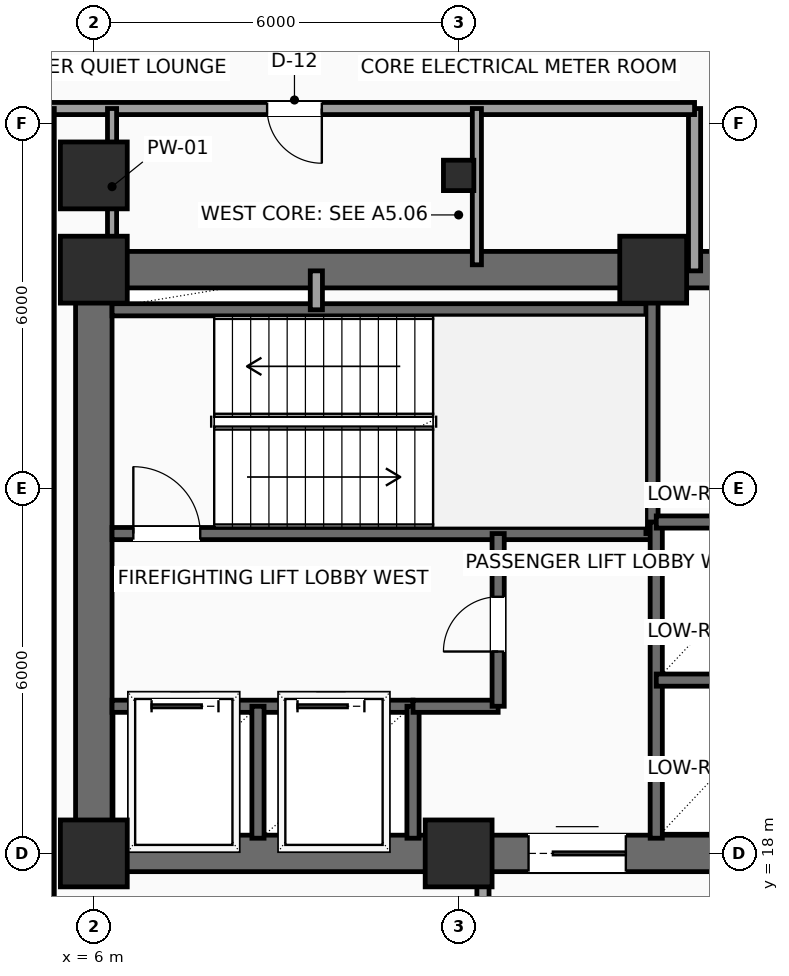
"""IFC4 building model, lengths in metres.
Left out: names, types, materials, properties, quantities, classifications, styles, units other than length and angle.
Written with IfcOpenShell. Run it as: python <this file> out.ifc"""

import sys

from ifc_helpers import new_model, si_unit, direction, frame, frame_2d, origin, origin_2d, place, context, subcontext, project, spatial, rectangle, hollow_rectangle, extrude, element, fill, save


model = new_model("IFC4")
c1 = context("Model", 3, precision=1e-05, world=origin(), true_north=direction((0.0, 1.0)))
c2 = subcontext(c1, "Body", "Model", "MODEL_VIEW")
j1 = project(units=[si_unit("LENGTHUNIT", "METRE"), si_unit("PLANEANGLEUNIT", "RADIAN")], contexts=[c1])
p1 = place(None, origin())
s1 = spatial("IfcSite", under=j1, at=p1, CompositionType="ELEMENT")
p2 = place(p1, origin())
s2 = spatial("IfcBuilding", under=s1, at=p2, CompositionType="ELEMENT")
p3 = place(p2, frame((0.0, 0.0, 107.1)))
s3 = spatial("IfcBuildingStorey", under=s2, at=p3, CompositionType="ELEMENT", Elevation=107.1)
for number, where, z_axis, x_axis in (
    (1, (6.0, 18.0, 0.0), (0.0, 0.0, 1.0), (1.0, 0.0, 0.0)),
    (2, (12.0, 18.0, 0.0), (0.0, 0.0, 1.0), (1.0, 0.0, 0.0)),
    (3, (6.0, 27.6, 0.0), (0.0, 0.0, 1.0), (1.0, 0.0, 0.0)),
    (4, (15.2, 27.6, 0.0), (0.0, 0.0, 1.0), (1.0, 0.0, 0.0)),
    (5, (6.0, 29.15, 0.0), (0.0, 0.0, 1.0), (1.0, 0.0, 0.0)),
):
    element("IfcColumn", number, at=place(p3, frame(where, z_axis=z_axis, x_axis=x_axis)), inside=s3, PredefinedType="COLUMN", context=c2, shape_type="SweptSolid", body=[
        extrude(rectangle(XDim=1.1, YDim=1.1, at=origin_2d()), origin(), (0.0, 0.0, 1.0), 3.75),
    ])
p4 = place(p3, frame((12.0, 29.15, 0.0), z_axis=(0.0, 0.0, 1.0), x_axis=(1.0, 0.0, 0.0)))
e6 = element("IfcColumn", 6, at=p4, inside=s3, PredefinedType="COLUMN", context=c2, shape_type="SweptSolid", body=[
    extrude(hollow_rectangle(XDim=0.5, YDim=0.5, WallThickness=0.025, InnerFilletRadius=0.025, OuterFilletRadius=0.04, at=origin_2d()), origin(), (0.0, 0.0, 1.0), 3.75),
])
p5 = place(p3, frame((6.0, 18.0, 0.0), z_axis=(0.0, 0.0, 1.0), x_axis=(1.0, 0.0, 0.0)))
e7 = element("IfcWall", 7, at=p5, inside=s3, PredefinedType="SHEAR", context=c2, shape_type="SweptSolid", body=[
    extrude(rectangle(XDim=12.0, YDim=0.6, at=frame_2d((6.0, 0.0))), origin(), (0.0, 0.0, 1.0), 3.475),
])
p6 = place(p5, frame((7.15, 0.0, 0.0)))
e8 = element("IfcOpeningElement", 8, at=p6, cuts=e7, PredefinedType="OPENING", context=c2, shape_type="SweptSolid", body=[
    extrude(rectangle(XDim=1.6, YDim=2.3, at=frame_2d((0.8, 1.15))), frame((0.0, 0.31, 0.0), z_axis=(0.0, -1.0, 0.0), x_axis=(1.0, 0.0, 0.0)), (0.0, 0.0, 1.0), 0.62),
])
p7 = place(p3, frame((6.0, 27.6, 0.0), z_axis=(0.0, 0.0, 1.0), x_axis=(1.0, 0.0, 0.0)))
e9 = element("IfcWall", 9, at=p7, inside=s3, PredefinedType="SHEAR", context=c2, shape_type="SweptSolid", body=[
    extrude(rectangle(XDim=12.0, YDim=0.6, at=frame_2d((6.0, 0.0))), origin(), (0.0, 0.0, 1.0), 3.475),
])
p8 = place(p7, frame((10.2, 0.0, 0.0)))
e10 = element("IfcOpeningElement", 10, at=p8, cuts=e9, PredefinedType="OPENING", context=c2, shape_type="SweptSolid", body=[
    extrude(rectangle(XDim=0.9, YDim=2.15, at=frame_2d((0.45, 1.075))), frame((0.0, 0.31, 0.0), z_axis=(0.0, -1.0, 0.0), x_axis=(1.0, 0.0, 0.0)), (0.0, 0.0, 1.0), 0.62),
])
p9 = place(p3, frame((6.0, 18.0, 0.0), z_axis=(0.0, 0.0, 1.0), x_axis=(0.0, 1.0, 0.0)))
e11 = element("IfcWall", 11, at=p9, inside=s3, PredefinedType="SHEAR", context=c2, shape_type="SweptSolid", body=[
    extrude(rectangle(XDim=9.6, YDim=0.6, at=frame_2d((4.8, 0.0))), origin(), (0.0, 0.0, 1.0), 3.475),
])
p10 = place(p3, frame((6.3, 23.26, 0.0), z_axis=(0.0, 0.0, 1.0), x_axis=(1.0, 0.0, 0.0)))
e12 = element("IfcWall", 12, at=p10, inside=s3, PredefinedType="SHEAR", context=c2, shape_type="SweptSolid", body=[
    extrude(rectangle(XDim=8.88, YDim=0.2, at=frame_2d((4.44, 0.0))), origin(), (0.0, 0.0, 1.0), 3.475),
])
p11 = place(p10, frame((0.35, 0.0, 0.0)))
e13 = element("IfcOpeningElement", 13, at=p11, cuts=e12, PredefinedType="OPENING", context=c2, shape_type="SweptSolid", body=[
    extrude(rectangle(XDim=1.1, YDim=2.2, at=frame_2d((0.55, 1.1))), frame((0.0, 0.11, 0.0), z_axis=(0.0, -1.0, 0.0), x_axis=(1.0, 0.0, 0.0)), (0.0, 0.0, 1.0), 0.22),
])
p12 = place(p3, frame((6.3, 26.94, 0.0), z_axis=(0.0, 0.0, 1.0), x_axis=(1.0, 0.0, 0.0)))
e14 = element("IfcWall", 14, at=p12, inside=s3, PredefinedType="SHEAR", context=c2, shape_type="SweptSolid", body=[
    extrude(rectangle(XDim=8.88, YDim=0.2, at=frame_2d((4.44, 0.0))), origin(), (0.0, 0.0, 1.0), 3.475),
])
p13 = place(p3, frame((15.18, 23.26, 0.0), z_axis=(0.0, 0.0, 1.0), x_axis=(0.0, 1.0, 0.0)))
e15 = element("IfcWall", 15, at=p13, inside=s3, PredefinedType="SHEAR", context=c2, shape_type="SweptSolid", body=[
    extrude(rectangle(XDim=4.04, YDim=0.2, at=frame_2d((2.02, 0.0))), origin(), (0.0, 0.0, 1.0), 3.475),
])
p14 = place(p3, frame((6.3, 20.42, 0.0), z_axis=(0.0, 0.0, 1.0), x_axis=(1.0, 0.0, 0.0)))
e16 = element("IfcWall", 16, at=p14, inside=s3, PredefinedType="SHEAR", context=c2, shape_type="SweptSolid", body=[
    extrude(rectangle(XDim=4.95, YDim=0.2, at=frame_2d((2.475, 0.0))), origin(), (0.0, 0.0, 1.0), 3.475),
])
p15 = place(p14, frame((0.65, 0.0, 0.0)))
e17 = element("IfcOpeningElement", 17, at=p15, cuts=e16, PredefinedType="OPENING", context=c2, shape_type="SweptSolid", body=[
    extrude(rectangle(XDim=1.1, YDim=2.2, at=frame_2d((0.55, 1.1))), frame((0.0, 0.11, 0.0), z_axis=(0.0, -1.0, 0.0), x_axis=(1.0, 0.0, 0.0)), (0.0, 0.0, 1.0), 0.22),
])
p16 = place(p14, frame((3.05, 0.0, 0.0)))
e18 = element("IfcOpeningElement", 18, at=p16, cuts=e16, PredefinedType="OPENING", context=c2, shape_type="SweptSolid", body=[
    extrude(rectangle(XDim=1.1, YDim=2.2, at=frame_2d((0.55, 1.1))), frame((0.0, 0.11, 0.0), z_axis=(0.0, -1.0, 0.0), x_axis=(1.0, 0.0, 0.0)), (0.0, 0.0, 1.0), 0.22),
])
for number, where, z_axis, x_axis in (
    (19, (8.7, 18.25, 0.0), (0.0, 0.0, 1.0), (0.0, 1.0, 0.0)),
    (20, (11.25, 18.25, 0.0), (0.0, 0.0, 1.0), (0.0, 1.0, 0.0)),
):
    element("IfcWall", number, at=place(p3, frame(where, z_axis=z_axis, x_axis=x_axis)), inside=s3, PredefinedType="SHEAR", context=c2, shape_type="SweptSolid", body=[
        extrude(rectangle(XDim=2.17, YDim=0.2, at=frame_2d((1.085, 0.0))), origin(), (0.0, 0.0, 1.0), 3.475),
    ])
p17 = place(p3, frame((11.25, 20.42, 0.0), z_axis=(0.0, 0.0, 1.0), x_axis=(1.0, 0.0, 0.0)))
e21 = element("IfcWall", 21, at=p17, inside=s3, PredefinedType="SHEAR", context=c2, shape_type="SweptSolid", body=[
    extrude(rectangle(XDim=1.4, YDim=0.2, at=frame_2d((0.7, 0.0))), origin(), (0.0, 0.0, 1.0), 3.475),
])
p18 = place(p3, frame((12.65, 20.42, 0.0), z_axis=(0.0, 0.0, 1.0), x_axis=(0.0, 1.0, 0.0)))
e22 = element("IfcWall", 22, at=p18, inside=s3, PredefinedType="SHEAR", context=c2, shape_type="SweptSolid", body=[
    extrude(rectangle(XDim=2.84, YDim=0.2, at=frame_2d((1.42, 0.0))), origin(), (0.0, 0.0, 1.0), 3.475),
])
p19 = place(p18, frame((0.9, 0.0, 0.0)))
e23 = element("IfcOpeningElement", 23, at=p19, cuts=e22, PredefinedType="OPENING", context=c2, shape_type="SweptSolid", body=[
    extrude(rectangle(XDim=0.9, YDim=2.15, at=frame_2d((0.45, 1.075))), frame((0.0, 0.11, 0.0), z_axis=(0.0, -1.0, 0.0), x_axis=(1.0, 0.0, 0.0)), (0.0, 0.0, 1.0), 0.22),
])
p20 = place(p3, frame((9.66, 26.94, 0.0), z_axis=(0.0, 0.0, 1.0), x_axis=(0.0, 1.0, 0.0)))
e24 = element("IfcWall", 24, at=p20, inside=s3, PredefinedType="SOLIDWALL", context=c2, shape_type="SweptSolid", body=[
    extrude(rectangle(XDim=0.64, YDim=0.2, at=frame_2d((0.32, 0.0))), origin(), (0.0, 0.0, 1.0), 3.475),
])
p21 = place(p3, frame((15.25, 18.25, 0.0), z_axis=(0.0, 0.0, 1.0), x_axis=(0.0, 1.0, 0.0)))
e25 = element("IfcWall", 25, at=p21, inside=s3, PredefinedType="SHEAR", context=c2, shape_type="SweptSolid", body=[
    extrude(rectangle(XDim=5.2, YDim=0.2, at=frame_2d((2.6, 0.0))), origin(), (0.0, 0.0, 1.0), 3.475),
])
p22 = place(p3, frame((15.25, 20.85, 0.0), z_axis=(0.0, 0.0, 1.0), x_axis=(1.0, 0.0, 0.0)))
e26 = element("IfcWall", 26, at=p22, inside=s3, PredefinedType="SHEAR", context=c2, shape_type="SweptSolid", body=[
    extrude(rectangle(XDim=2.4, YDim=0.2, at=frame_2d((1.2, 0.0))), origin(), (0.0, 0.0, 1.0), 3.475),
])
p23 = place(p3, frame((15.25, 23.45, 0.0), z_axis=(0.0, 0.0, 1.0), x_axis=(1.0, 0.0, 0.0)))
e27 = element("IfcWall", 27, at=p23, inside=s3, PredefinedType="SHEAR", context=c2, shape_type="SweptSolid", body=[
    extrude(rectangle(XDim=2.45, YDim=0.2, at=frame_2d((1.225, 0.0))), origin(), (0.0, 0.0, 1.0), 3.475),
])
p24 = place(p3, frame((15.88, 27.58, 0.0), z_axis=(0.0, 0.0, 1.0), x_axis=(0.0, 1.0, 0.0)))
e28 = element("IfcWall", 28, at=p24, inside=s3, PredefinedType="PARTITIONING", context=c2, shape_type="SweptSolid", body=[
    extrude(rectangle(XDim=2.67, YDim=0.2, at=frame_2d((1.335, 0.0))), origin(), (0.0, 0.0, 1.0), 3.475),
])
p25 = place(p3, frame((15.88, 30.25, 0.0), z_axis=(0.0, 0.0, 1.0), x_axis=(-1.0, 0.0, 0.0)))
e29 = element("IfcWall", 29, at=p25, inside=s3, PredefinedType="PARTITIONING", context=c2, shape_type="SweptSolid", body=[
    extrude(rectangle(XDim=10.63, YDim=0.2, at=frame_2d((5.315, 0.0))), origin(), (0.0, 0.0, 1.0), 3.475),
])
p26 = place(p25, frame((6.13, 0.0, 0.0)))
e30 = element("IfcOpeningElement", 30, at=p26, cuts=e29, PredefinedType="OPENING", context=c2, shape_type="SweptSolid", body=[
    extrude(rectangle(XDim=0.9, YDim=2.1, at=frame_2d((0.45, 1.05))), frame((0.0, 0.11, 0.0), z_axis=(0.0, -1.0, 0.0), x_axis=(1.0, 0.0, 0.0)), (0.0, 0.0, 1.0), 0.22),
])
p27 = place(p3, frame((5.25, 30.25, 0.0), z_axis=(0.0, 0.0, 1.0), x_axis=(0.0, -1.0, 0.0)))
e31 = element("IfcWall", 31, at=p27, inside=s3, PredefinedType="PARTITIONING", context=c2, shape_type="SweptSolid", body=[
    extrude(rectangle(XDim=13.1, YDim=0.2, at=frame_2d((6.55, 0.0))), origin(), (0.0, 0.0, 1.0), 3.475),
])
p28 = place(p3, frame((12.4, 17.15, 0.0), z_axis=(0.0, 0.0, 1.0), x_axis=(0.0, 1.0, 0.0)))
e32 = element("IfcWall", 32, at=p28, inside=s3, PredefinedType="PARTITIONING", context=c2, shape_type="SweptSolid", body=[
    extrude(rectangle(XDim=0.8, YDim=0.2, at=frame_2d((0.4, 0.0))), origin(), (0.0, 0.0, 1.0), 3.475),
])
for number, where, z_axis, x_axis in (
    (33, (6.3, 27.68, 0.0), (0.0, 0.0, 1.0), (0.0, 1.0, 0.0)),
    (34, (12.3, 27.68, 0.0), (0.0, 0.0, 1.0), (0.0, 1.0, 0.0)),
):
    element("IfcWall", number, at=place(p3, frame(where, z_axis=z_axis, x_axis=x_axis)), inside=s3, PredefinedType="PARTITIONING", context=c2, shape_type="SweptSolid", body=[
        extrude(rectangle(XDim=2.57, YDim=0.15, at=frame_2d((1.285, 0.0))), origin(), (0.0, 0.0, 1.0), 2.967),
    ])
p29 = place(p6, origin())
e35 = element("IfcDoor", 35, at=p29, inside=s3, OperationType="DOUBLE_DOOR_SLIDING", PredefinedType="DOOR", context=c2, shape_type="SweptSolid", body=[
    extrude(rectangle(XDim=1.6, YDim=2.3, at=frame_2d((0.8, 1.15))), frame((0.0, 0.025, 0.0), z_axis=(0.0, -1.0, 0.0), x_axis=(1.0, 0.0, 0.0)), (0.0, 0.0, 1.0), 0.05),
])
fill(e8, e35)
p30 = place(p11, origin())
e36 = element("IfcDoor", 36, at=p30, inside=s3, OperationType="SINGLE_SWING_LEFT", PredefinedType="DOOR", context=c2, shape_type="SweptSolid", body=[
    extrude(rectangle(XDim=1.1, YDim=2.2, at=frame_2d((0.55, 1.1))), frame((0.0, 0.025, 0.0), z_axis=(0.0, -1.0, 0.0), x_axis=(1.0, 0.0, 0.0)), (0.0, 0.0, 1.0), 0.05),
])
fill(e13, e36)
p31 = place(p15, origin())
e37 = element("IfcDoor", 37, at=p31, inside=s3, OperationType="SLIDING_TO_LEFT", PredefinedType="DOOR", context=c2, shape_type="SweptSolid", body=[
    extrude(rectangle(XDim=1.1, YDim=2.2, at=frame_2d((0.55, 1.1))), frame((0.0, 0.025, 0.0), z_axis=(0.0, -1.0, 0.0), x_axis=(1.0, 0.0, 0.0)), (0.0, 0.0, 1.0), 0.05),
])
fill(e17, e37)
p32 = place(p16, origin())
e38 = element("IfcDoor", 38, at=p32, inside=s3, OperationType="SLIDING_TO_LEFT", PredefinedType="DOOR", context=c2, shape_type="SweptSolid", body=[
    extrude(rectangle(XDim=1.1, YDim=2.2, at=frame_2d((0.55, 1.1))), frame((0.0, 0.025, 0.0), z_axis=(0.0, -1.0, 0.0), x_axis=(1.0, 0.0, 0.0)), (0.0, 0.0, 1.0), 0.05),
])
fill(e18, e38)
p33 = place(p19, origin())
e39 = element("IfcDoor", 39, at=p33, inside=s3, OperationType="SINGLE_SWING_LEFT", PredefinedType="DOOR", context=c2, shape_type="SweptSolid", body=[
    extrude(rectangle(XDim=0.9, YDim=2.15, at=frame_2d((0.45, 1.075))), frame((0.0, 0.025, 0.0), z_axis=(0.0, -1.0, 0.0), x_axis=(1.0, 0.0, 0.0)), (0.0, 0.0, 1.0), 0.05),
])
fill(e23, e39)
p34 = place(p26, origin())
e40 = element("IfcDoor", 40, at=p34, inside=s3, OperationType="SINGLE_SWING_LEFT", PredefinedType="DOOR", context=c2, shape_type="SweptSolid", body=[
    extrude(rectangle(XDim=0.9, YDim=2.1, at=frame_2d((0.45, 1.05))), frame((0.0, 0.025, 0.0), z_axis=(0.0, -1.0, 0.0), x_axis=(1.0, 0.0, 0.0)), (0.0, 0.0, 1.0), 0.05),
])
fill(e30, e40)
save(model, sys.argv[1])
